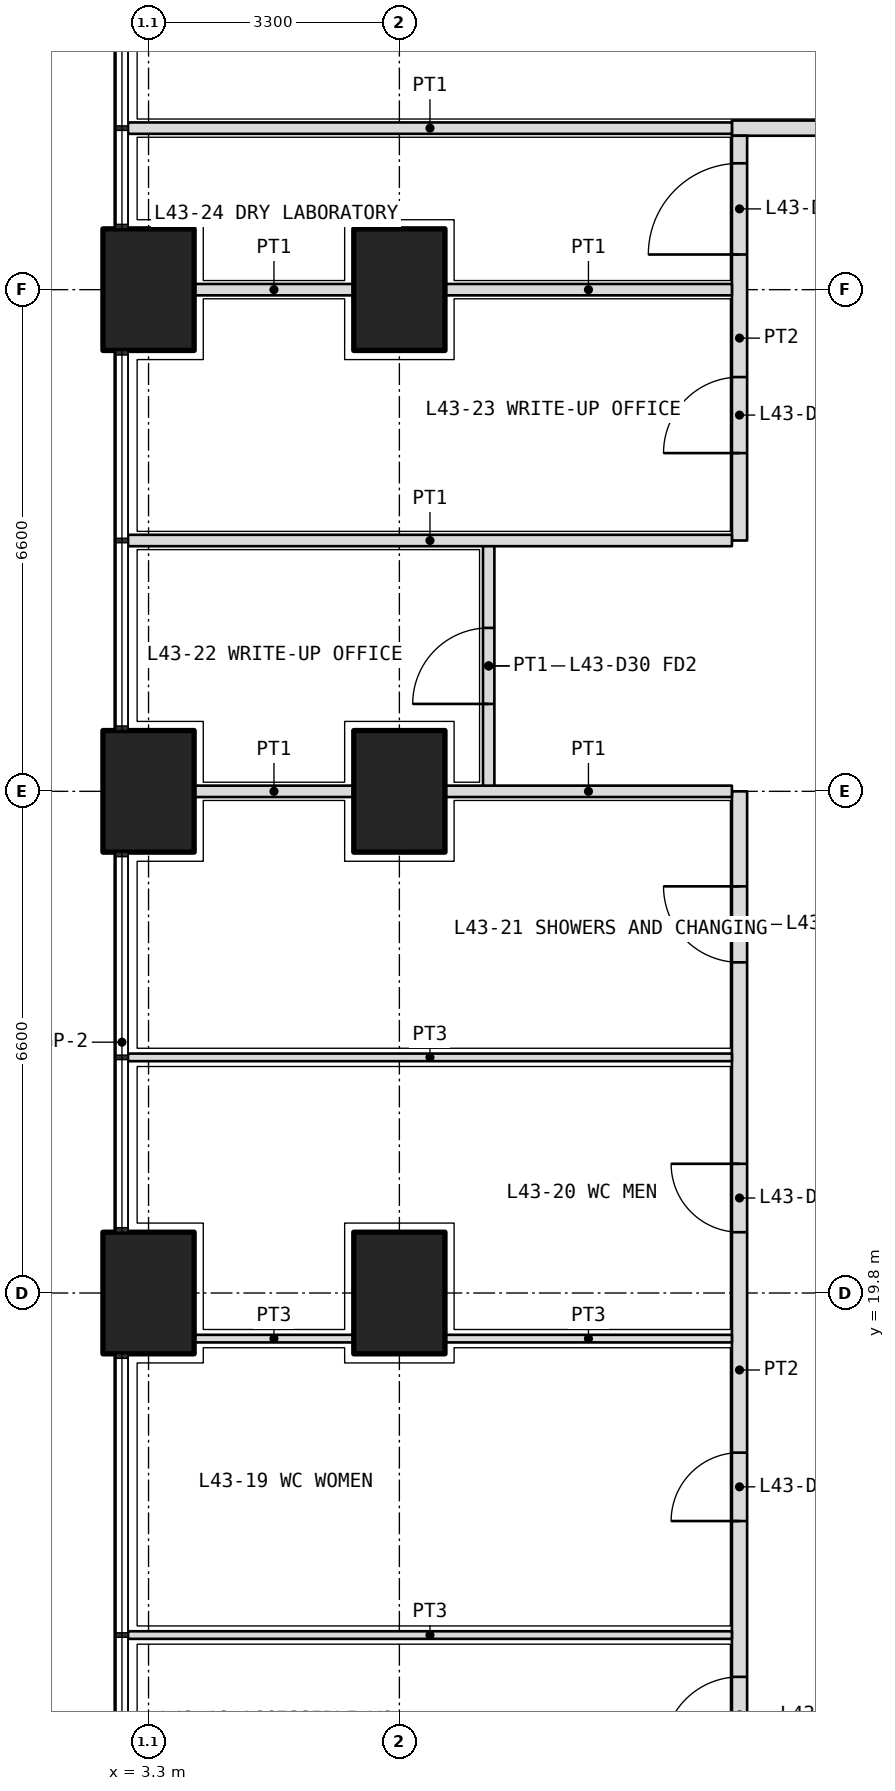
"""IFC4 building model, lengths in metres.
Left out: names, types, materials, properties, quantities, classifications, styles, units other than length and angle.
Written with IfcOpenShell. Run it as: python <this file> out.ifc"""

import sys

from ifc_helpers import new_model, si_unit, direction, frame, frame_2d, origin, origin_2d, place, context, subcontext, project, spatial, rectangle, extrude, element, fill, save


model = new_model("IFC4")
c1 = context("Model", 3, precision=1e-05, world=origin(), true_north=direction((0.0, 1.0)))
c2 = subcontext(c1, "Body", "Model", "MODEL_VIEW")
j1 = project(units=[si_unit("LENGTHUNIT", "METRE"), si_unit("PLANEANGLEUNIT", "RADIAN")], contexts=[c1])
p1 = place(None, origin())
s1 = spatial("IfcSite", under=j1, at=p1, CompositionType="ELEMENT")
p2 = place(p1, origin())
s2 = spatial("IfcBuilding", under=s1, at=p2, CompositionType="ELEMENT")
p3 = place(p2, frame((0.0, 0.0, 189.3)))
s3 = spatial("IfcBuildingStorey", under=s2, at=p3, CompositionType="ELEMENT", Elevation=189.3)
for number, where, z_axis, x_axis in (
    (1, (3.3, 19.8, 0.0), (0.0, 0.0, 1.0), (0.0, 1.0, 0.0)),
    (2, (3.3, 26.4, 0.0), (0.0, 0.0, 1.0), (0.0, 1.0, 0.0)),
    (3, (3.3, 33.0, 0.0), (0.0, 0.0, 1.0), (0.0, 1.0, 0.0)),
    (4, (6.6, 19.8, 0.0), (0.0, 0.0, 1.0), (0.0, 1.0, 0.0)),
    (5, (6.6, 26.4, 0.0), (0.0, 0.0, 1.0), (0.0, 1.0, 0.0)),
    (6, (6.6, 33.0, 0.0), (0.0, 0.0, 1.0), (0.0, 1.0, 0.0)),
):
    element("IfcColumn", number, at=place(p3, frame(where, z_axis=z_axis, x_axis=x_axis)), inside=s3, PredefinedType="COLUMN", context=c2, shape_type="SweptSolid", body=[
        extrude(rectangle(XDim=1.6, YDim=1.2, at=origin_2d()), origin(), (0.0, 0.0, 1.0), 4.2),
    ])
p4 = place(p3, frame((10.975, 35.125, 0.0), z_axis=(0.0, 0.0, 1.0), x_axis=(1.0, 0.0, 0.0)))
e7 = element("IfcWall", 7, at=p4, inside=s3, PredefinedType="PARTITIONING", context=c2, shape_type="SweptSolid", body=[
    extrude(rectangle(XDim=30.85, YDim=0.2, at=frame_2d((15.425, 0.0))), origin(), (0.0, 0.0, 1.0), 2.85),
])
p5 = place(p4, frame((7.262, 0.0, 0.0)))
e8 = element("IfcOpeningElement", 8, at=p5, cuts=e7, PredefinedType="OPENING", context=c2, shape_type="SweptSolid", body=[
    extrude(rectangle(XDim=1.0, YDim=2.1, at=frame_2d((0.5, 1.05))), frame((0.0, 0.11, 0.0), z_axis=(0.0, -1.0, 0.0), x_axis=(1.0, 0.0, 0.0)), (0.0, 0.0, 1.0), 0.22),
])
p6 = place(p4, frame((16.625, 0.0, 0.0)))
e9 = element("IfcOpeningElement", 9, at=p6, cuts=e7, PredefinedType="OPENING", context=c2, shape_type="SweptSolid", body=[
    extrude(rectangle(XDim=1.0, YDim=2.1, at=frame_2d((0.5, 1.05))), frame((0.0, 0.11, 0.0), z_axis=(0.0, -1.0, 0.0), x_axis=(1.0, 0.0, 0.0)), (0.0, 0.0, 1.0), 0.22),
])
p7 = place(p4, frame((19.925, 0.0, 0.0)))
e10 = element("IfcOpeningElement", 10, at=p7, cuts=e7, PredefinedType="OPENING", context=c2, shape_type="SweptSolid", body=[
    extrude(rectangle(XDim=1.0, YDim=2.1, at=frame_2d((0.5, 1.05))), frame((0.0, 0.11, 0.0), z_axis=(0.0, -1.0, 0.0), x_axis=(1.0, 0.0, 0.0)), (0.0, 0.0, 1.0), 0.22),
])
p8 = place(p4, frame((24.725, 0.0, 0.0)))
e11 = element("IfcOpeningElement", 11, at=p8, cuts=e7, PredefinedType="OPENING", context=c2, shape_type="SweptSolid", body=[
    extrude(rectangle(XDim=1.2, YDim=2.1, at=frame_2d((0.6, 1.05))), frame((0.0, 0.11, 0.0), z_axis=(0.0, -1.0, 0.0), x_axis=(1.0, 0.0, 0.0)), (0.0, 0.0, 1.0), 0.22),
])
p9 = place(p4, frame((29.188, 0.0, 0.0)))
e12 = element("IfcOpeningElement", 12, at=p9, cuts=e7, PredefinedType="OPENING", context=c2, shape_type="SweptSolid", body=[
    extrude(rectangle(XDim=1.0, YDim=2.1, at=frame_2d((0.5, 1.05))), frame((0.0, 0.11, 0.0), z_axis=(0.0, -1.0, 0.0), x_axis=(1.0, 0.0, 0.0)), (0.0, 0.0, 1.0), 0.22),
])
p10 = place(p3, frame((11.075, 11.175, 0.0), z_axis=(0.0, 0.0, 1.0), x_axis=(0.0, 1.0, 0.0)))
e13 = element("IfcWall", 13, at=p10, inside=s3, PredefinedType="PARTITIONING", context=c2, shape_type="SweptSolid", body=[
    extrude(rectangle(XDim=15.225, YDim=0.2, at=frame_2d((7.612, 0.0))), origin(), (0.0, 0.0, 1.0), 2.85),
])
p11 = place(p10, frame((0.363, 0.0, 0.0)))
e14 = element("IfcOpeningElement", 14, at=p11, cuts=e13, PredefinedType="OPENING", context=c2, shape_type="SweptSolid", body=[
    extrude(rectangle(XDim=1.2, YDim=2.1, at=frame_2d((0.6, 1.05))), frame((0.0, 0.11, 0.0), z_axis=(0.0, -1.0, 0.0), x_axis=(1.0, 0.0, 0.0)), (0.0, 0.0, 1.0), 0.22),
])
p12 = place(p10, frame((2.575, 0.0, 0.0)))
e15 = element("IfcOpeningElement", 15, at=p12, cuts=e13, PredefinedType="OPENING", context=c2, shape_type="SweptSolid", body=[
    extrude(rectangle(XDim=1.0, YDim=2.1, at=frame_2d((0.5, 1.05))), frame((0.0, 0.11, 0.0), z_axis=(0.0, -1.0, 0.0), x_axis=(1.0, 0.0, 0.0)), (0.0, 0.0, 1.0), 0.22),
])
p13 = place(p10, frame((5.625, 0.0, 0.0)))
e16 = element("IfcOpeningElement", 16, at=p13, cuts=e13, PredefinedType="OPENING", context=c2, shape_type="SweptSolid", body=[
    extrude(rectangle(XDim=0.9, YDim=2.1, at=frame_2d((0.45, 1.05))), frame((0.0, 0.11, 0.0), z_axis=(0.0, -1.0, 0.0), x_axis=(1.0, 0.0, 0.0)), (0.0, 0.0, 1.0), 0.22),
])
p14 = place(p10, frame((9.425, 0.0, 0.0)))
e17 = element("IfcOpeningElement", 17, at=p14, cuts=e13, PredefinedType="OPENING", context=c2, shape_type="SweptSolid", body=[
    extrude(rectangle(XDim=0.9, YDim=2.1, at=frame_2d((0.45, 1.05))), frame((0.0, 0.11, 0.0), z_axis=(0.0, -1.0, 0.0), x_axis=(1.0, 0.0, 0.0)), (0.0, 0.0, 1.0), 0.22),
])
p15 = place(p10, frame((12.975, 0.0, 0.0)))
e18 = element("IfcOpeningElement", 18, at=p15, cuts=e13, PredefinedType="OPENING", context=c2, shape_type="SweptSolid", body=[
    extrude(rectangle(XDim=1.0, YDim=2.1, at=frame_2d((0.5, 1.05))), frame((0.0, 0.11, 0.0), z_axis=(0.0, -1.0, 0.0), x_axis=(1.0, 0.0, 0.0)), (0.0, 0.0, 1.0), 0.22),
])
p16 = place(p3, frame((11.075, 29.7, 0.0), z_axis=(0.0, 0.0, 1.0), x_axis=(0.0, 1.0, 0.0)))
e19 = element("IfcWall", 19, at=p16, inside=s3, PredefinedType="PARTITIONING", context=c2, shape_type="SweptSolid", body=[
    extrude(rectangle(XDim=5.325, YDim=0.2, at=frame_2d((2.663, 0.0))), origin(), (0.0, 0.0, 1.0), 2.85),
])
p17 = place(p16, frame((1.15, 0.0, 0.0)))
e20 = element("IfcOpeningElement", 20, at=p17, cuts=e19, PredefinedType="OPENING", context=c2, shape_type="SweptSolid", body=[
    extrude(rectangle(XDim=1.0, YDim=2.1, at=frame_2d((0.5, 1.05))), frame((0.0, 0.11, 0.0), z_axis=(0.0, -1.0, 0.0), x_axis=(1.0, 0.0, 0.0)), (0.0, 0.0, 1.0), 0.22),
])
p18 = place(p16, frame((3.762, 0.0, 0.0)))
e21 = element("IfcOpeningElement", 21, at=p18, cuts=e19, PredefinedType="OPENING", context=c2, shape_type="SweptSolid", body=[
    extrude(rectangle(XDim=1.2, YDim=2.1, at=frame_2d((0.6, 1.05))), frame((0.0, 0.11, 0.0), z_axis=(0.0, -1.0, 0.0), x_axis=(1.0, 0.0, 0.0)), (0.0, 0.0, 1.0), 0.22),
])
p19 = place(p3, frame((3.03, 35.125, 0.0), z_axis=(0.0, 0.0, 1.0), x_axis=(1.0, 0.0, 0.0)))
e22 = element("IfcWall", 22, at=p19, inside=s3, PredefinedType="PARTITIONING", context=c2, shape_type="SweptSolid", body=[
    extrude(rectangle(XDim=7.945, YDim=0.15, at=frame_2d((3.973, 0.0))), origin(), (0.0, 0.0, 1.0), 2.7),
])
p20 = place(p3, frame((3.03, 15.3, 0.0), z_axis=(0.0, 0.0, 1.0), x_axis=(1.0, 0.0, 0.0)))
e23 = element("IfcWall", 23, at=p20, inside=s3, PredefinedType="PARTITIONING", context=c2, shape_type="SweptSolid", body=[
    extrude(rectangle(XDim=7.945, YDim=0.1, at=frame_2d((3.973, 0.0))), origin(), (0.0, 0.0, 1.0), 2.7),
])
p21 = place(p3, frame((3.9, 19.2, 0.0), z_axis=(0.0, 0.0, 1.0), x_axis=(1.0, 0.0, 0.0)))
e24 = element("IfcWall", 24, at=p21, inside=s3, PredefinedType="PARTITIONING", context=c2, shape_type="SweptSolid", body=[
    extrude(rectangle(XDim=2.1, YDim=0.1, at=frame_2d((1.05, 0.0))), origin(), (0.0, 0.0, 1.0), 2.85),
])
p22 = place(p3, frame((7.2, 19.2, 0.0), z_axis=(0.0, 0.0, 1.0), x_axis=(1.0, 0.0, 0.0)))
e25 = element("IfcWall", 25, at=p22, inside=s3, PredefinedType="PARTITIONING", context=c2, shape_type="SweptSolid", body=[
    extrude(rectangle(XDim=3.775, YDim=0.1, at=frame_2d((1.888, 0.0))), origin(), (0.0, 0.0, 1.0), 2.85),
])
p23 = place(p3, frame((3.03, 22.9, 0.0), z_axis=(0.0, 0.0, 1.0), x_axis=(1.0, 0.0, 0.0)))
e26 = element("IfcWall", 26, at=p23, inside=s3, PredefinedType="PARTITIONING", context=c2, shape_type="SweptSolid", body=[
    extrude(rectangle(XDim=7.945, YDim=0.1, at=frame_2d((3.973, 0.0))), origin(), (0.0, 0.0, 1.0), 2.7),
])
p24 = place(p3, frame((7.775, 26.4, 0.0), z_axis=(0.0, 0.0, 1.0), x_axis=(0.0, 1.0, 0.0)))
e27 = element("IfcWall", 27, at=p24, inside=s3, PredefinedType="PARTITIONING", context=c2, shape_type="SweptSolid", body=[
    extrude(rectangle(XDim=3.3, YDim=0.15, at=frame_2d((1.65, 0.0))), origin(), (0.0, 0.0, 1.0), 2.85),
])
p25 = place(p24, frame((1.15, 0.0, 0.0)))
e28 = element("IfcOpeningElement", 28, at=p25, cuts=e27, PredefinedType="OPENING", context=c2, shape_type="SweptSolid", body=[
    extrude(rectangle(XDim=1.0, YDim=2.1, at=frame_2d((0.5, 1.05))), frame((0.0, 0.085, 0.0), z_axis=(0.0, -1.0, 0.0), x_axis=(1.0, 0.0, 0.0)), (0.0, 0.0, 1.0), 0.17),
])
p26 = place(p3, frame((3.9, 26.4, 0.0), z_axis=(0.0, 0.0, 1.0), x_axis=(1.0, 0.0, 0.0)))
e29 = element("IfcWall", 29, at=p26, inside=s3, PredefinedType="PARTITIONING", context=c2, shape_type="SweptSolid", body=[
    extrude(rectangle(XDim=2.1, YDim=0.15, at=frame_2d((1.05, 0.0))), origin(), (0.0, 0.0, 1.0), 2.85),
])
p27 = place(p3, frame((7.2, 26.4, 0.0), z_axis=(0.0, 0.0, 1.0), x_axis=(1.0, 0.0, 0.0)))
e30 = element("IfcWall", 30, at=p27, inside=s3, PredefinedType="PARTITIONING", context=c2, shape_type="SweptSolid", body=[
    extrude(rectangle(XDim=3.775, YDim=0.15, at=frame_2d((1.888, 0.0))), origin(), (0.0, 0.0, 1.0), 2.85),
])
p28 = place(p3, frame((3.03, 29.7, 0.0), z_axis=(0.0, 0.0, 1.0), x_axis=(1.0, 0.0, 0.0)))
e31 = element("IfcWall", 31, at=p28, inside=s3, PredefinedType="PARTITIONING", context=c2, shape_type="SweptSolid", body=[
    extrude(rectangle(XDim=7.945, YDim=0.15, at=frame_2d((3.973, 0.0))), origin(), (0.0, 0.0, 1.0), 2.7),
])
p29 = place(p3, frame((3.9, 33.0, 0.0), z_axis=(0.0, 0.0, 1.0), x_axis=(1.0, 0.0, 0.0)))
e32 = element("IfcWall", 32, at=p29, inside=s3, PredefinedType="PARTITIONING", context=c2, shape_type="SweptSolid", body=[
    extrude(rectangle(XDim=2.1, YDim=0.15, at=frame_2d((1.05, 0.0))), origin(), (0.0, 0.0, 1.0), 2.85),
])
p30 = place(p3, frame((7.2, 33.0, 0.0), z_axis=(0.0, 0.0, 1.0), x_axis=(1.0, 0.0, 0.0)))
e33 = element("IfcWall", 33, at=p30, inside=s3, PredefinedType="PARTITIONING", context=c2, shape_type="SweptSolid", body=[
    extrude(rectangle(XDim=3.775, YDim=0.15, at=frame_2d((1.888, 0.0))), origin(), (0.0, 0.0, 1.0), 2.85),
])
p31 = place(p12, origin())
e34 = element("IfcDoor", 34, at=p31, inside=s3, OperationType="SINGLE_SWING_LEFT", PredefinedType="DOOR", context=c2, shape_type="SweptSolid", body=[
    extrude(rectangle(XDim=1.0, YDim=2.1, at=frame_2d((0.5, 1.05))), frame((0.0, 0.025, 0.0), z_axis=(0.0, -1.0, 0.0), x_axis=(1.0, 0.0, 0.0)), (0.0, 0.0, 1.0), 0.05),
])
fill(e15, e34)
p32 = place(p13, origin())
e35 = element("IfcDoor", 35, at=p32, inside=s3, OperationType="SINGLE_SWING_LEFT", PredefinedType="DOOR", context=c2, shape_type="SweptSolid", body=[
    extrude(rectangle(XDim=0.9, YDim=2.1, at=frame_2d((0.45, 1.05))), frame((0.0, 0.025, 0.0), z_axis=(0.0, -1.0, 0.0), x_axis=(1.0, 0.0, 0.0)), (0.0, 0.0, 1.0), 0.05),
])
fill(e16, e35)
p33 = place(p14, origin())
e36 = element("IfcDoor", 36, at=p33, inside=s3, OperationType="SINGLE_SWING_RIGHT", PredefinedType="DOOR", context=c2, shape_type="SweptSolid", body=[
    extrude(rectangle(XDim=0.9, YDim=2.1, at=frame_2d((0.45, 1.05))), frame((0.0, 0.025, 0.0), z_axis=(0.0, -1.0, 0.0), x_axis=(1.0, 0.0, 0.0)), (0.0, 0.0, 1.0), 0.05),
])
fill(e17, e36)
p34 = place(p15, origin())
e37 = element("IfcDoor", 37, at=p34, inside=s3, OperationType="SINGLE_SWING_RIGHT", PredefinedType="DOOR", context=c2, shape_type="SweptSolid", body=[
    extrude(rectangle(XDim=1.0, YDim=2.1, at=frame_2d((0.5, 1.05))), frame((0.0, 0.025, 0.0), z_axis=(0.0, -1.0, 0.0), x_axis=(1.0, 0.0, 0.0)), (0.0, 0.0, 1.0), 0.05),
])
fill(e18, e37)
p35 = place(p25, origin())
e38 = element("IfcDoor", 38, at=p35, inside=s3, OperationType="SINGLE_SWING_LEFT", PredefinedType="DOOR", context=c2, shape_type="SweptSolid", body=[
    extrude(rectangle(XDim=1.0, YDim=2.1, at=frame_2d((0.5, 1.05))), frame((0.0, 0.025, 0.0), z_axis=(0.0, -1.0, 0.0), x_axis=(1.0, 0.0, 0.0)), (0.0, 0.0, 1.0), 0.05),
])
fill(e28, e38)
p36 = place(p17, origin())
e39 = element("IfcDoor", 39, at=p36, inside=s3, OperationType="SINGLE_SWING_LEFT", PredefinedType="DOOR", context=c2, shape_type="SweptSolid", body=[
    extrude(rectangle(XDim=1.0, YDim=2.1, at=frame_2d((0.5, 1.05))), frame((0.0, 0.025, 0.0), z_axis=(0.0, -1.0, 0.0), x_axis=(1.0, 0.0, 0.0)), (0.0, 0.0, 1.0), 0.05),
])
fill(e20, e39)
p37 = place(p18, origin())
e40 = element("IfcDoor", 40, at=p37, inside=s3, OperationType="DOUBLE_DOOR_SINGLE_SWING", PredefinedType="DOOR", context=c2, shape_type="SweptSolid", body=[
    extrude(rectangle(XDim=1.2, YDim=2.1, at=frame_2d((0.6, 1.05))), frame((0.0, 0.025, 0.0), z_axis=(0.0, -1.0, 0.0), x_axis=(1.0, 0.0, 0.0)), (0.0, 0.0, 1.0), 0.05),
])
fill(e21, e40)
save(model, sys.argv[1])
